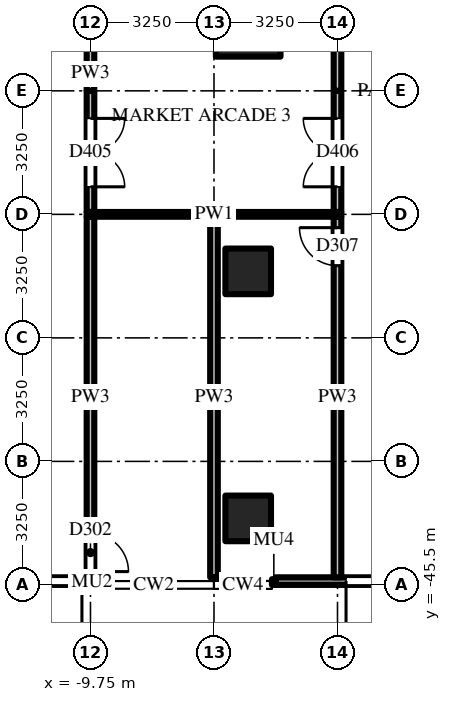
"""IFC4 building model, lengths in metres.
Left out: names, types, materials, properties, quantities, classifications, styles, units other than length and angle.
Written with IfcOpenShell. Run it as: python <this file> out.ifc"""

import sys

from ifc_helpers import new_model, si_unit, direction, frame, frame_2d, origin, origin_2d, place, context, subcontext, project, spatial, rectangle, extrude, source, transform, mapped, element, fill, save


model = new_model("IFC4")
c1 = context("Model", 3, precision=1e-05, world=origin(), true_north=direction((0.0, 1.0)))
c2 = subcontext(c1, "Body", "Model", "MODEL_VIEW")
j1 = project(units=[si_unit("LENGTHUNIT", "METRE"), si_unit("PLANEANGLEUNIT", "RADIAN")], contexts=[c1])
p1 = place(None, origin())
s1 = spatial("IfcSite", under=j1, at=p1, CompositionType="ELEMENT")
p2 = place(p1, origin())
s2 = spatial("IfcBuilding", under=s1, at=p2, CompositionType="ELEMENT")
p3 = place(p2, origin())
s3 = spatial("IfcBuildingStorey", under=s2, at=p3, CompositionType="ELEMENT", Elevation=0.0)
m1 = source(origin(), c2, "Body", "SweptSolid", [
    extrude(rectangle(XDim=1.7, YDim=1.7, at=origin_2d()), origin(), (0.0, 0.0, 1.0), 8.5),
])
p4 = place(p3, frame((-5.6, -30.75, -0.5), z_axis=(0.0, 0.0, 1.0), x_axis=(1.0, 0.0, 0.0)))
e1 = element("IfcColumn", 1, at=p4, inside=s3, PredefinedType="COLUMN", context=c2, shape_type="MappedRepresentation", body=[
    mapped(m1, transform((0.0, 0.0, 0.0))),
])
m2 = source(origin(), c2, "Body", "SweptSolid", [
    extrude(rectangle(XDim=1.2, YDim=1.2, at=origin_2d()), origin(), (0.0, 0.0, 1.0), 8.5),
])
for number, where, z_axis, x_axis in (
    (2, (-5.6, -37.25, -0.5), (0.0, 0.0, 1.0), (1.0, 0.0, 0.0)),
    (3, (-5.6, -43.75, -0.5), (0.0, 0.0, 1.0), (1.0, 0.0, 0.0)),
):
    element("IfcColumn", number, at=place(p3, frame(where, z_axis=z_axis, x_axis=x_axis)), inside=s3, PredefinedType="COLUMN", context=c2, shape_type="MappedRepresentation", body=[
        mapped(m2, transform((0.0, 0.0, 0.0))),
    ])
m3 = source(origin(), c2, "Body", "SweptSolid", [
    extrude(rectangle(XDim=3.25, YDim=0.2, at=frame_2d((1.625, 0.0))), origin(), (0.0, 0.0, 1.0), 7.7),
])
p5 = place(p3, frame((-9.75, -45.4, 0.0), z_axis=(0.0, 0.0, 1.0), x_axis=(-1.0, 0.0, 0.0)))
e4 = element("IfcWall", 4, at=p5, inside=s3, PredefinedType="SOLIDWALL", context=c2, shape_type="MappedRepresentation", body=[
    mapped(m3, transform((0.0, 0.0, 0.0))),
])
m4 = source(origin(), c2, "Body", "SweptSolid", [
    extrude(rectangle(XDim=2.8, YDim=2.4, at=frame_2d((1.4, 1.2))), frame((0.0, 0.11, 0.0), z_axis=(0.0, -1.0, 0.0), x_axis=(1.0, 0.0, 0.0)), (0.0, 0.0, 1.0), 0.22),
])
p6 = place(p5, frame((0.225, 0.0, 0.0)))
e5 = element("IfcOpeningElement", 5, at=p6, cuts=e4, PredefinedType="OPENING", context=c2, shape_type="MappedRepresentation", body=[
    mapped(m4, transform((0.0, 0.0, 0.0))),
])
m5 = source(origin(), c2, "Body", "SweptSolid", [
    extrude(rectangle(XDim=6.5, YDim=0.2, at=frame_2d((3.25, 0.0))), origin(), (0.0, 0.0, 1.0), 7.7),
])
p7 = place(p3, frame((1.625, -45.4, 0.0), z_axis=(0.0, 0.0, 1.0), x_axis=(-1.0, 0.0, 0.0)))
e6 = element("IfcWall", 6, at=p7, inside=s3, PredefinedType="SOLIDWALL", context=c2, shape_type="MappedRepresentation", body=[
    mapped(m5, transform((0.0, 0.0, 0.0))),
])
m6 = source(origin(), c2, "Body", "SweptSolid", [
    extrude(rectangle(XDim=2.8, YDim=2.6, at=frame_2d((1.4, 1.3))), frame((0.0, 0.11, 0.0), z_axis=(0.0, -1.0, 0.0), x_axis=(1.0, 0.0, 0.0)), (0.0, 0.0, 1.0), 0.22),
])
p8 = place(p7, frame((1.85, 0.0, 0.0)))
e7 = element("IfcOpeningElement", 7, at=p8, cuts=e6, PredefinedType="OPENING", context=c2, shape_type="MappedRepresentation", body=[
    mapped(m6, transform((0.0, 0.0, 0.0))),
])
m7 = source(origin(), c2, "Body", "SweptSolid", [
    extrude(rectangle(XDim=3.188, YDim=0.2, at=frame_2d((1.594, 0.0))), origin(), (0.0, 0.0, 1.0), 6.997),
])
p9 = place(p3, frame((-9.75, -32.5, 0.0), z_axis=(0.0, 0.0, 1.0), x_axis=(0.0, -1.0, 0.0)))
e8 = element("IfcWall", 8, at=p9, inside=s3, PredefinedType="PARTITIONING", context=c2, shape_type="MappedRepresentation", body=[
    mapped(m7, transform((0.0, 0.0, 0.0))),
])
m8 = source(origin(), c2, "Body", "SweptSolid", [
    extrude(rectangle(XDim=1.8, YDim=2.1, at=frame_2d((0.9, 1.05))), frame((0.0, 0.11, 0.0), z_axis=(0.0, -1.0, 0.0), x_axis=(1.0, 0.0, 0.0)), (0.0, 0.0, 1.0), 0.22),
])
p10 = place(p9, frame((0.725, 0.0, 0.0)))
e9 = element("IfcOpeningElement", 9, at=p10, cuts=e8, PredefinedType="OPENING", context=c2, shape_type="MappedRepresentation", body=[
    mapped(m8, transform((0.0, 0.0, 0.0))),
])
m9 = source(origin(), c2, "Body", "SweptSolid", [
    extrude(rectangle(XDim=9.488, YDim=0.2, at=frame_2d((4.744, 0.0))), origin(), (0.0, 0.0, 1.0), 6.762),
])
p11 = place(p3, frame((-9.75, -35.812, 0.0), z_axis=(0.0, 0.0, 1.0), x_axis=(0.0, -1.0, 0.0)))
e10 = element("IfcWall", 10, at=p11, inside=s3, PredefinedType="PARTITIONING", context=c2, shape_type="MappedRepresentation", body=[
    mapped(m9, transform((0.0, 0.0, 0.0))),
])
m10 = source(origin(), c2, "Body", "SweptSolid", [
    extrude(rectangle(XDim=1.0, YDim=2.1, at=frame_2d((0.5, 1.05))), frame((0.0, 0.11, 0.0), z_axis=(0.0, -1.0, 0.0), x_axis=(1.0, 0.0, 0.0)), (0.0, 0.0, 1.0), 0.22),
])
p12 = place(p11, frame((8.337, 0.0, 0.0)))
e11 = element("IfcOpeningElement", 11, at=p12, cuts=e10, PredefinedType="OPENING", context=c2, shape_type="MappedRepresentation", body=[
    mapped(m10, transform((0.0, 0.0, 0.0))),
])
m11 = source(origin(), c2, "Body", "SweptSolid", [
    extrude(rectangle(XDim=4.1, YDim=0.2, at=frame_2d((2.05, 0.0))), origin(), (0.0, 0.0, 1.0), 6.762),
])
p13 = place(p3, frame((-9.75, -32.5, 0.0), z_axis=(0.0, 0.0, 1.0), x_axis=(0.0, 1.0, 0.0)))
e12 = element("IfcWall", 12, at=p13, inside=s3, PredefinedType="PARTITIONING", context=c2, shape_type="MappedRepresentation", body=[
    mapped(m11, transform((0.0, 0.0, 0.0))),
])
p14 = place(p3, frame((-6.5, -45.3, 0.0), z_axis=(0.0, 0.0, 1.0), x_axis=(0.0, 1.0, 0.0)))
e13 = element("IfcWall", 13, at=p14, inside=s3, PredefinedType="PARTITIONING", context=c2, shape_type="MappedRepresentation", body=[
    mapped(m9, transform((0.0, 0.0, 0.0))),
])
p15 = place(p3, frame((-3.25, -35.688, 0.0), z_axis=(0.0, 0.0, 1.0), x_axis=(0.0, 1.0, 0.0)))
e14 = element("IfcWall", 14, at=p15, inside=s3, PredefinedType="PARTITIONING", context=c2, shape_type="MappedRepresentation", body=[
    mapped(m7, transform((0.0, 0.0, 0.0))),
])
p16 = place(p15, frame((0.663, 0.0, 0.0)))
e15 = element("IfcOpeningElement", 15, at=p16, cuts=e14, PredefinedType="OPENING", context=c2, shape_type="MappedRepresentation", body=[
    mapped(m8, transform((0.0, 0.0, 0.0))),
])
m12 = source(origin(), c2, "Body", "SweptSolid", [
    extrude(rectangle(XDim=9.488, YDim=0.2, at=frame_2d((4.744, 0.0))), origin(), (0.0, 0.0, 1.0), 6.918),
])
p17 = place(p3, frame((-3.25, -45.3, 0.0), z_axis=(0.0, 0.0, 1.0), x_axis=(0.0, 1.0, 0.0)))
e16 = element("IfcWall", 16, at=p17, inside=s3, PredefinedType="PARTITIONING", context=c2, shape_type="MappedRepresentation", body=[
    mapped(m12, transform((0.0, 0.0, 0.0))),
])
p18 = place(p17, frame((8.2, 0.0, 0.0)))
e17 = element("IfcOpeningElement", 17, at=p18, cuts=e16, PredefinedType="OPENING", context=c2, shape_type="MappedRepresentation", body=[
    mapped(m10, transform((0.0, 0.0, 0.0))),
])
m13 = source(origin(), c2, "Body", "SweptSolid", [
    extrude(rectangle(XDim=12.9, YDim=0.2, at=frame_2d((6.45, 0.0))), origin(), (0.0, 0.0, 1.0), 6.918),
])
p19 = place(p3, frame((-3.25, -32.5, 0.0), z_axis=(0.0, 0.0, 1.0), x_axis=(0.0, 1.0, 0.0)))
e18 = element("IfcWall", 18, at=p19, inside=s3, PredefinedType="PARTITIONING", context=c2, shape_type="MappedRepresentation", body=[
    mapped(m13, transform((0.0, 0.0, 0.0))),
])
p20 = place(p3, frame((-3.15, -35.75, 0.0), z_axis=(0.0, 0.0, 1.0), x_axis=(-1.0, 0.0, 0.0)))
e19 = element("IfcWall", 19, at=p20, inside=s3, PredefinedType="PARTITIONING", context=c2, shape_type="SweptSolid", body=[
    extrude(rectangle(XDim=6.7, YDim=0.125, at=frame_2d((3.35, 0.0))), origin(), (0.0, 0.0, 1.0), 6.997),
])
m14 = source(origin(), c2, "Body", "SweptSolid", [
    extrude(rectangle(XDim=2.8, YDim=2.4, at=frame_2d((1.4, 1.2))), frame((0.0, 0.025, 0.0), z_axis=(0.0, -1.0, 0.0), x_axis=(1.0, 0.0, 0.0)), (0.0, 0.0, 1.0), 0.05),
])
p21 = place(p6, origin())
e20 = element("IfcDoor", 20, at=p21, inside=s3, OperationType="DOUBLE_DOOR_SINGLE_SWING", PredefinedType="DOOR", context=c2, shape_type="MappedRepresentation", body=[
    mapped(m14, transform((0.0, 0.0, 0.0))),
])
fill(e5, e20)
m15 = source(origin(), c2, "Body", "SweptSolid", [
    extrude(rectangle(XDim=2.8, YDim=2.6, at=frame_2d((1.4, 1.3))), frame((0.0, 0.025, 0.0), z_axis=(0.0, -1.0, 0.0), x_axis=(1.0, 0.0, 0.0)), (0.0, 0.0, 1.0), 0.05),
])
p22 = place(p8, origin())
e21 = element("IfcDoor", 21, at=p22, inside=s3, OperationType="DOUBLE_DOOR_SINGLE_SWING", PredefinedType="DOOR", context=c2, shape_type="MappedRepresentation", body=[
    mapped(m15, transform((0.0, 0.0, 0.0))),
])
fill(e7, e21)
m16 = source(origin(), c2, "Body", "SweptSolid", [
    extrude(rectangle(XDim=1.0, YDim=2.1, at=frame_2d((0.5, 1.05))), frame((0.0, 0.025, 0.0), z_axis=(0.0, -1.0, 0.0), x_axis=(1.0, 0.0, 0.0)), (0.0, 0.0, 1.0), 0.05),
])
p23 = place(p12, origin())
e22 = element("IfcDoor", 22, at=p23, inside=s3, OperationType="SINGLE_SWING_RIGHT", PredefinedType="DOOR", context=c2, shape_type="MappedRepresentation", body=[
    mapped(m16, transform((0.0, 0.0, 0.0))),
])
fill(e11, e22)
p24 = place(p18, origin())
e23 = element("IfcDoor", 23, at=p24, inside=s3, OperationType="SINGLE_SWING_RIGHT", PredefinedType="DOOR", context=c2, shape_type="MappedRepresentation", body=[
    mapped(m16, transform((0.0, 0.0, 0.0))),
])
fill(e17, e23)
m17 = source(origin(), c2, "Body", "SweptSolid", [
    extrude(rectangle(XDim=1.8, YDim=2.1, at=frame_2d((0.9, 1.05))), frame((0.0, 0.025, 0.0), z_axis=(0.0, -1.0, 0.0), x_axis=(1.0, 0.0, 0.0)), (0.0, 0.0, 1.0), 0.05),
])
p25 = place(p10, origin())
e24 = element("IfcDoor", 24, at=p25, inside=s3, OperationType="DOUBLE_DOOR_SINGLE_SWING", PredefinedType="DOOR", context=c2, shape_type="MappedRepresentation", body=[
    mapped(m17, transform((0.0, 0.0, 0.0))),
])
fill(e9, e24)
p26 = place(p16, origin())
e25 = element("IfcDoor", 25, at=p26, inside=s3, OperationType="DOUBLE_DOOR_SINGLE_SWING", PredefinedType="DOOR", context=c2, shape_type="MappedRepresentation", body=[
    mapped(m17, transform((0.0, 0.0, 0.0))),
])
fill(e15, e25)
save(model, sys.argv[1])
